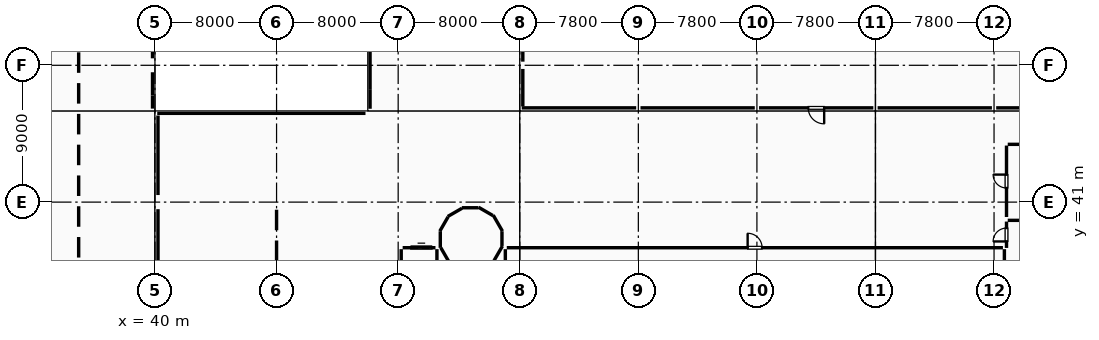
"""IFC4 building model, lengths in metres.
Left out: names, types, materials, properties, quantities, classifications, styles, units other than length and angle.
Written with IfcOpenShell. Run it as: python <this file> out.ifc"""

import sys

from ifc_helpers import new_model, si_unit, direction, frame, frame_2d, origin, origin_2d, place, context, subcontext, project, spatial, rectangle, hollow_rectangle, i_section, extrude, element, fill, save


model = new_model("IFC4")
c1 = context("Model", 3, precision=1e-05, world=origin(), true_north=direction((0.0, 1.0)))
c2 = subcontext(c1, "Body", "Model", "MODEL_VIEW")
j1 = project(units=[si_unit("LENGTHUNIT", "METRE"), si_unit("PLANEANGLEUNIT", "RADIAN")], contexts=[c1])
p1 = place(None, origin())
s1 = spatial("IfcSite", under=j1, at=p1, CompositionType="ELEMENT")
p2 = place(p1, origin())
s2 = spatial("IfcBuilding", under=s1, at=p2, CompositionType="ELEMENT")
p3 = place(p2, origin())
s3 = spatial("IfcBuildingStorey", under=s2, at=p3, CompositionType="ELEMENT", Elevation=0.0)
for number, where, z_axis, x_axis in (
    (1, (40.0, 41.0, 0.0), (0.0, 0.0, 1.0), (1.0, 0.0, 0.0)),
    (2, (40.0, 50.0, 0.0), (0.0, 0.0, 1.0), (1.0, 0.0, 0.0)),
):
    element("IfcColumn", number, at=place(p3, frame(where, z_axis=z_axis, x_axis=x_axis)), inside=s3, PredefinedType="COLUMN", context=c2, shape_type="SweptSolid", body=[
        extrude(rectangle(XDim=0.9, YDim=0.9, at=origin_2d()), origin(), (0.0, 0.0, 1.0), 5.4),
    ])
for number, where, z_axis, x_axis in (
    (3, (48.0, 41.0, 0.0), (0.0, 0.0, 1.0), (1.0, 0.0, 0.0)),
    (4, (56.0, 41.0, 0.0), (0.0, 0.0, 1.0), (1.0, 0.0, 0.0)),
):
    element("IfcColumn", number, at=place(p3, frame(where, z_axis=z_axis, x_axis=x_axis)), inside=s3, PredefinedType="COLUMN", context=c2, shape_type="SweptSolid", body=[
        extrude(rectangle(XDim=0.75, YDim=0.75, at=origin_2d()), origin(), (0.0, 0.0, 1.0), 5.4),
    ])
p4 = place(p3, frame((56.0, 50.0, 0.0), z_axis=(0.0, 0.0, 1.0), x_axis=(1.0, 0.0, 0.0)))
e5 = element("IfcColumn", 5, at=p4, inside=s3, PredefinedType="COLUMN", context=c2, shape_type="SweptSolid", body=[
    extrude(rectangle(XDim=0.9, YDim=0.9, at=origin_2d()), origin(), (0.0, 0.0, 1.0), 5.4),
])
p5 = place(p3, frame((64.0, 50.0, 0.0), z_axis=(0.0, 0.0, 1.0), x_axis=(1.0, 0.0, 0.0)))
e6 = element("IfcColumn", 6, at=p5, inside=s3, PredefinedType="COLUMN", context=c2, shape_type="SweptSolid", body=[
    extrude(hollow_rectangle(XDim=0.45, YDim=0.45, WallThickness=0.02, at=origin_2d()), origin(), (0.0, 0.0, 1.0), 5.4),
])
for number, where, z_axis, x_axis in (
    (7, (40.0, 48.2, 0.0), (0.0, 0.0, 1.0), (1.0, 0.0, 0.0)),
    (8, (54.0, 48.2, 0.0), (0.0, 0.0, 1.0), (1.0, 0.0, 0.0)),
):
    element("IfcColumn", number, at=place(p3, frame(where, z_axis=z_axis, x_axis=x_axis)), inside=s3, PredefinedType="COLUMN", context=c2, shape_type="SweptSolid", body=[
        extrude(i_section(OverallWidth=0.25, OverallDepth=0.35, WebThickness=0.01, FlangeThickness=0.012, FilletRadius=0.012, at=origin_2d()), origin(), (0.0, 0.0, 1.0), 5.4),
    ])
for number, where, z_axis, x_axis in (
    (9, (64.0, 47.0, 0.0), (0.0, 0.0, 1.0), (1.0, 0.0, 0.0)),
    (10, (71.8, 47.0, 0.0), (0.0, 0.0, 1.0), (1.0, 0.0, 0.0)),
    (11, (79.6, 47.0, 0.0), (0.0, 0.0, 1.0), (1.0, 0.0, 0.0)),
    (12, (87.4, 47.0, 0.0), (0.0, 0.0, 1.0), (1.0, 0.0, 0.0)),
    (13, (95.2, 47.0, 0.0), (0.0, 0.0, 1.0), (1.0, 0.0, 0.0)),
):
    element("IfcColumn", number, at=place(p3, frame(where, z_axis=z_axis, x_axis=x_axis)), inside=s3, PredefinedType="COLUMN", context=c2, shape_type="SweptSolid", body=[
        extrude(i_section(OverallWidth=0.25, OverallDepth=0.45, WebThickness=0.011, FlangeThickness=0.014, FilletRadius=0.015, at=origin_2d()), origin(), (0.0, 0.0, 1.0), 5.4),
    ])
p6 = place(p3, frame((70.0, 41.0, 0.0), z_axis=(0.0, 0.0, 1.0), x_axis=(1.0, 0.0, 0.0)))
e14 = element("IfcColumn", 14, at=p6, inside=s3, PredefinedType="COLUMN", context=c2, shape_type="SweptSolid", body=[
    extrude(rectangle(XDim=1.2, YDim=1.2, at=origin_2d()), origin(), (0.0, 0.0, 1.0), 5.4),
])
for number, where, z_axis, x_axis in (
    (15, (79.6, 41.0, 0.0), (0.0, 0.0, 1.0), (1.0, 0.0, 0.0)),
    (16, (87.4, 41.0, 0.0), (0.0, 0.0, 1.0), (1.0, 0.0, 0.0)),
    (17, (95.2, 41.0, 0.0), (0.0, 0.0, 1.0), (1.0, 0.0, 0.0)),
):
    element("IfcColumn", number, at=place(p3, frame(where, z_axis=z_axis, x_axis=x_axis)), inside=s3, PredefinedType="COLUMN", context=c2, shape_type="SweptSolid", body=[
        extrude(rectangle(XDim=1.05, YDim=1.05, at=origin_2d()), origin(), (0.0, 0.0, 1.0), 5.4),
    ])
p7 = place(p3, frame((39.84, 52.117, 0.0), z_axis=(0.0, 0.0, 1.0), x_axis=(0.0, -1.0, 0.0)))
e18 = element("IfcWall", 18, at=p7, inside=s3, PredefinedType="STANDARD", context=c2, shape_type="SweptSolid", body=[
    extrude(rectangle(XDim=1.659, YDim=0.28, at=frame_2d((0.83, 0.0))), origin(), (0.0, 0.0, 1.0), 5.12),
])
p8 = place(p3, frame((39.84, 49.542, 0.0), z_axis=(0.0, 0.0, 1.0), x_axis=(0.0, -1.0, 0.0)))
e19 = element("IfcWall", 19, at=p8, inside=s3, PredefinedType="STANDARD", context=c2, shape_type="SweptSolid", body=[
    extrude(rectangle(XDim=1.525, YDim=0.28, at=frame_2d((0.762, 0.0))), origin(), (0.0, 0.0, 1.0), 5.12),
])
p9 = place(p3, frame((39.84, 48.017, 0.0), z_axis=(0.0, 0.0, 1.0), x_axis=(0.0, -1.0, 0.0)))
e20 = element("IfcWall", 20, at=p9, inside=s3, PredefinedType="STANDARD", context=c2, shape_type="SweptSolid", body=[
    extrude(rectangle(XDim=0.867, YDim=0.28, at=frame_2d((0.434, 0.0))), origin(), (0.0, 0.0, 1.0), 4.355),
])
p10 = place(p3, frame((40.15, 46.84, 0.0), z_axis=(0.0, 0.0, 1.0), x_axis=(1.0, 0.0, 0.0)))
e21 = element("IfcWall", 21, at=p10, inside=s3, PredefinedType="STANDARD", context=c2, shape_type="SweptSolid", body=[
    extrude(rectangle(XDim=13.7, YDim=0.28, at=frame_2d((6.85, 0.0))), origin(), (0.0, 0.0, 1.0), 5.12),
])
p11 = place(p10, frame((5.65, 0.0, 0.95)))
e22 = element("IfcOpeningElement", 22, at=p11, cuts=e21, PredefinedType="OPENING", context=c2, shape_type="SweptSolid", body=[
    extrude(rectangle(XDim=2.4, YDim=2.1, at=frame_2d((1.2, 1.05))), frame((0.0, 0.15, 0.0), z_axis=(0.0, -1.0, 0.0), x_axis=(1.0, 0.0, 0.0)), (0.0, 0.0, 1.0), 0.3),
])
p12 = place(p3, frame((54.15, 47.14, 0.0), z_axis=(0.0, 0.0, 1.0), x_axis=(0.0, 1.0, 0.0)))
e23 = element("IfcWall", 23, at=p12, inside=s3, PredefinedType="ELEMENTEDWALL", context=c2, shape_type="SweptSolid", body=[
    extrude(rectangle(XDim=1.243, YDim=0.26, at=frame_2d((0.622, 0.0))), origin(), (0.0, 0.0, 1.0), 5.12),
])
p13 = place(p3, frame((54.15, 48.383, 0.0), z_axis=(0.0, 0.0, 1.0), x_axis=(0.0, 1.0, 0.0)))
e24 = element("IfcWall", 24, at=p13, inside=s3, PredefinedType="ELEMENTEDWALL", context=c2, shape_type="SweptSolid", body=[
    extrude(rectangle(XDim=4.1, YDim=0.26, at=frame_2d((2.05, 0.0))), origin(), (0.0, 0.0, 1.0), 3.675),
])
p14 = place(p13, frame((1.417, 0.0, 0.95)))
e25 = element("IfcOpeningElement", 25, at=p14, cuts=e24, PredefinedType="OPENING", context=c2, shape_type="SweptSolid", body=[
    extrude(rectangle(XDim=0.9, YDim=1.2, at=frame_2d((0.45, 0.6))), frame((0.0, 0.14, 0.0), z_axis=(0.0, -1.0, 0.0), x_axis=(1.0, 0.0, 0.0)), (0.0, 0.0, 1.0), 0.28),
])
p15 = place(p3, frame((62.861, 39.086, 0.0), z_axis=(0.0, 0.0, 1.0), x_axis=(-0.499930512259, 0.866065518833, 0.0)))
e26 = element("IfcWall", 26, at=p15, inside=s3, PredefinedType="SHEAR", context=c2, shape_type="SweptSolid", body=[
    extrude(rectangle(XDim=1.219, YDim=0.35, at=frame_2d((0.609, 0.0))), origin(), (0.0, 0.0, 1.0), 5.12),
])
for number, where, z_axis, x_axis in (
    (27, (62.233, 40.115, 0.0), (0.0, 0.0, 1.0), (-0.866, 0.5, 0.0)),
    (28, (61.283, 40.628, 0.0), (0.0, 0.0, 1.0), (-1.0, 0.0, 0.0)),
    (29, (60.205, 40.598, 0.0), (0.0, 0.0, 1.0), (-0.866, -0.5, 0.0)),
    (30, (59.285, 40.033, 0.0), (0.0, 0.0, 1.0), (-0.5, -0.866, 0.0)),
    (31, (58.771, 39.083, 0.0), (0.0, 0.0, 1.0), (0.0, -1.0, 0.0)),
    (32, (58.802, 38.004, 0.0), (0.0, 0.0, 1.0), (0.5, -0.866, 0.0)),
):
    element("IfcWall", number, at=place(p3, frame(where, z_axis=z_axis, x_axis=x_axis)), inside=s3, PredefinedType="SHEAR", context=c2, shape_type="SweptSolid", body=[
        extrude(rectangle(XDim=1.093, YDim=0.35, at=frame_2d((0.546, 0.0))), origin(), (0.0, 0.0, 1.0), 5.12),
    ])
p16 = place(p3, frame((59.367, 37.085, 0.0), z_axis=(0.0, 0.0, 1.0), x_axis=(0.866021955858, -0.500005971936, 0.0)))
e33 = element("IfcWall", 33, at=p16, inside=s3, PredefinedType="SHEAR", context=c2, shape_type="SweptSolid", body=[
    extrude(rectangle(XDim=1.093, YDim=0.35, at=frame_2d((0.547, 0.0))), origin(), (0.0, 0.0, 1.0), 5.12),
])
for number, where, z_axis, x_axis in (
    (34, (61.396, 36.602, 0.0), (0.0, 0.0, 1.0), (0.866, 0.5, 0.0)),
    (35, (62.315, 37.167, 0.0), (0.0, 0.0, 1.0), (0.5, 0.866, 0.0)),
):
    element("IfcWall", number, at=place(p3, frame(where, z_axis=z_axis, x_axis=x_axis)), inside=s3, PredefinedType="SHEAR", context=c2, shape_type="SweptSolid", body=[
        extrude(rectangle(XDim=1.093, YDim=0.35, at=frame_2d((0.546, 0.0))), origin(), (0.0, 0.0, 1.0), 5.12),
    ])
p17 = place(p3, frame((62.828, 38.116, 0.0), z_axis=(0.0, 0.0, 1.0), x_axis=(0.0, 1.0, 0.0)))
e36 = element("IfcWall", 36, at=p17, inside=s3, PredefinedType="SHEAR", context=c2, shape_type="SweptSolid", body=[
    extrude(rectangle(XDim=0.967, YDim=0.35, at=frame_2d((0.483, 0.0))), origin(), (0.0, 0.0, 1.0), 5.12),
])
for number, where, z_axis, x_axis in (
    (37, (58.55, 37.905, 0.0), (0.0, 0.0, 1.0), (0.0, -1.0, 0.0)),
    (38, (63.05, 36.445, 0.0), (0.0, 0.0, 1.0), (0.0, 1.0, 0.0)),
):
    element("IfcWall", number, at=place(p3, frame(where, z_axis=z_axis, x_axis=x_axis)), inside=s3, PredefinedType="PARTITIONING", context=c2, shape_type="SweptSolid", body=[
        extrude(rectangle(XDim=1.46, YDim=0.15, at=frame_2d((0.73, 0.0))), origin(), (0.0, 0.0, 1.0), 5.11),
    ])
p18 = place(p3, frame((63.145, 38.0, 0.0), z_axis=(0.0, 0.0, 1.0), x_axis=(1.0, 0.0, 0.0)))
e39 = element("IfcWall", 39, at=p18, inside=s3, PredefinedType="PARTITIONING", context=c2, shape_type="SweptSolid", body=[
    extrude(rectangle(XDim=32.64, YDim=0.15, at=frame_2d((16.32, 0.0))), origin(), (0.0, 0.0, 1.0), 4.3),
])
p19 = place(p18, frame((15.845, 0.0, 0.0)))
e40 = element("IfcOpeningElement", 40, at=p19, cuts=e39, PredefinedType="OPENING", context=c2, shape_type="SweptSolid", body=[
    extrude(rectangle(XDim=0.95, YDim=2.15, at=frame_2d((0.475, 1.075))), frame((0.0, 0.085, 0.0), z_axis=(0.0, -1.0, 0.0), x_axis=(1.0, 0.0, 0.0)), (0.0, 0.0, 1.0), 0.17),
])
p20 = place(p3, frame((95.88, 37.905, 0.0), z_axis=(0.0, 0.0, 1.0), x_axis=(0.0, -1.0, 0.0)))
e41 = element("IfcWall", 41, at=p20, inside=s3, PredefinedType="PARTITIONING", context=c2, shape_type="SweptSolid", body=[
    extrude(rectangle(XDim=13.78, YDim=0.15, at=frame_2d((6.89, 0.0))), origin(), (0.0, 0.0, 1.0), 5.4),
])
p21 = place(p20, frame((6.45, 0.0, 0.0)))
e42 = element("IfcOpeningElement", 42, at=p21, cuts=e41, PredefinedType="OPENING", context=c2, shape_type="SweptSolid", body=[
    extrude(rectangle(XDim=0.88, YDim=2.1, at=frame_2d((0.44, 1.05))), frame((0.0, 0.085, 0.0), z_axis=(0.0, -1.0, 0.0), x_axis=(1.0, 0.0, 0.0)), (0.0, 0.0, 1.0), 0.17),
])
p22 = place(p3, frame((56.2, 32.39, 0.0), z_axis=(0.0, 0.0, 1.0), x_axis=(0.0, 1.0, 0.0)))
e43 = element("IfcWall", 43, at=p22, inside=s3, PredefinedType="PARTITIONING", context=c2, shape_type="SweptSolid", body=[
    extrude(rectangle(XDim=5.515, YDim=0.15, at=frame_2d((2.758, 0.0))), origin(), (0.0, 0.0, 1.0), 4.5),
])
p23 = place(p22, frame((2.601, 0.0, 0.0)))
e44 = element("IfcOpeningElement", 44, at=p23, cuts=e43, PredefinedType="OPENING", context=c2, shape_type="SweptSolid", body=[
    extrude(rectangle(XDim=1.8, YDim=2.15, at=frame_2d((0.9, 1.075))), frame((0.0, 0.085, 0.0), z_axis=(0.0, -1.0, 0.0), x_axis=(1.0, 0.0, 0.0)), (0.0, 0.0, 1.0), 0.17),
])
p24 = place(p3, frame((56.295, 38.0, 0.0), z_axis=(0.0, 0.0, 1.0), x_axis=(1.0, 0.0, 0.0)))
e45 = element("IfcWall", 45, at=p24, inside=s3, PredefinedType="PARTITIONING", context=c2, shape_type="SweptSolid", body=[
    extrude(rectangle(XDim=2.16, YDim=0.15, at=frame_2d((1.08, 0.0))), origin(), (0.0, 0.0, 1.0), 5.11),
])
p25 = place(p24, frame((0.532, 0.0, 0.0)))
e46 = element("IfcOpeningElement", 46, at=p25, cuts=e45, PredefinedType="OPENING", context=c2, shape_type="SweptSolid", body=[
    extrude(rectangle(XDim=1.4, YDim=2.15, at=frame_2d((0.7, 1.075))), frame((0.0, 0.085, 0.0), z_axis=(0.0, -1.0, 0.0), x_axis=(1.0, 0.0, 0.0)), (0.0, 0.0, 1.0), 0.17),
])
p26 = place(p3, frame((40.2, 34.52, 0.0), z_axis=(0.0, 0.0, 1.0), x_axis=(0.0, 1.0, 0.0)))
e47 = element("IfcWall", 47, at=p26, inside=s3, PredefinedType="PARTITIONING", context=c2, shape_type="SweptSolid", body=[
    extrude(rectangle(XDim=6.015, YDim=0.2, at=frame_2d((3.007, 0.0))), origin(), (0.0, 0.0, 1.0), 4.25),
])
p27 = place(p3, frame((40.2, 41.465, 0.0), z_axis=(0.0, 0.0, 1.0), x_axis=(0.0, 1.0, 0.0)))
e48 = element("IfcWall", 48, at=p27, inside=s3, PredefinedType="PARTITIONING", context=c2, shape_type="SweptSolid", body=[
    extrude(rectangle(XDim=5.231, YDim=0.2, at=frame_2d((2.615, 0.0))), origin(), (0.0, 0.0, 1.0), 4.35),
])
p28 = place(p3, frame((102.871, 47.2, 0.0), z_axis=(0.0, 0.0, 1.0), x_axis=(-1.0, 0.0, 0.0)))
e49 = element("IfcWall", 49, at=p28, inside=s3, PredefinedType="PARTITIONING", context=c2, shape_type="SweptSolid", body=[
    extrude(rectangle(XDim=7.531, YDim=0.15, at=frame_2d((3.766, 0.0))), origin(), (0.0, 0.0, 1.0), 4.3),
])
p29 = place(p3, frame((95.06, 47.2, 0.0), z_axis=(0.0, 0.0, 1.0), x_axis=(-1.0, 0.0, 0.0)))
e50 = element("IfcWall", 50, at=p29, inside=s3, PredefinedType="PARTITIONING", context=c2, shape_type="SweptSolid", body=[
    extrude(rectangle(XDim=7.52, YDim=0.15, at=frame_2d((3.76, 0.0))), origin(), (0.0, 0.0, 1.0), 4.3),
])
p30 = place(p3, frame((87.26, 47.2, 0.0), z_axis=(0.0, 0.0, 1.0), x_axis=(-1.0, 0.0, 0.0)))
e51 = element("IfcWall", 51, at=p30, inside=s3, PredefinedType="PARTITIONING", context=c2, shape_type="SweptSolid", body=[
    extrude(rectangle(XDim=7.52, YDim=0.15, at=frame_2d((3.76, 0.0))), origin(), (0.0, 0.0, 1.0), 4.3),
])
p31 = place(p30, frame((3.235, 0.0, 0.0)))
e52 = element("IfcOpeningElement", 52, at=p31, cuts=e51, PredefinedType="OPENING", context=c2, shape_type="SweptSolid", body=[
    extrude(rectangle(XDim=1.05, YDim=2.15, at=frame_2d((0.525, 1.075))), frame((0.0, 0.085, 0.0), z_axis=(0.0, -1.0, 0.0), x_axis=(1.0, 0.0, 0.0)), (0.0, 0.0, 1.0), 0.17),
])
p32 = place(p3, frame((79.46, 47.2, 0.0), z_axis=(0.0, 0.0, 1.0), x_axis=(-1.0, 0.0, 0.0)))
e53 = element("IfcWall", 53, at=p32, inside=s3, PredefinedType="PARTITIONING", context=c2, shape_type="SweptSolid", body=[
    extrude(rectangle(XDim=7.52, YDim=0.15, at=frame_2d((3.76, 0.0))), origin(), (0.0, 0.0, 1.0), 4.3),
])
p33 = place(p3, frame((71.66, 47.2, 0.0), z_axis=(0.0, 0.0, 1.0), x_axis=(-1.0, 0.0, 0.0)))
e54 = element("IfcWall", 54, at=p33, inside=s3, PredefinedType="PARTITIONING", context=c2, shape_type="SweptSolid", body=[
    extrude(rectangle(XDim=7.531, YDim=0.15, at=frame_2d((3.766, 0.0))), origin(), (0.0, 0.0, 1.0), 4.3),
])
p34 = place(p3, frame((64.2, 47.295, 0.0), z_axis=(0.0, 0.0, 1.0), x_axis=(0.0, 1.0, 0.0)))
e55 = element("IfcWall", 55, at=p34, inside=s3, PredefinedType="PARTITIONING", context=c2, shape_type="SweptSolid", body=[
    extrude(rectangle(XDim=2.465, YDim=0.15, at=frame_2d((1.232, 0.0))), origin(), (0.0, 0.0, 1.0), 4.5),
])
p35 = place(p3, frame((64.2, 50.24, 0.0), z_axis=(0.0, 0.0, 1.0), x_axis=(0.0, 1.0, 0.0)))
e56 = element("IfcWall", 56, at=p35, inside=s3, PredefinedType="PARTITIONING", context=c2, shape_type="SweptSolid", body=[
    extrude(rectangle(XDim=5.52, YDim=0.15, at=frame_2d((2.76, 0.0))), origin(), (0.0, 0.0, 1.0), 4.55),
])
p36 = place(p3, frame((96.02, 37.985, 0.0), z_axis=(0.0, 0.0, 1.0), x_axis=(0.0, 1.0, 0.0)))
e57 = element("IfcWall", 57, at=p36, inside=s3, PredefinedType="PARTITIONING", context=c2, shape_type="SweptSolid", body=[
    extrude(rectangle(XDim=1.735, YDim=0.12, at=frame_2d((0.867, 0.0))), origin(), (0.0, 0.0, 1.0), 5.11),
])
p37 = place(p36, frame((0.427, 0.0, 0.0)))
e58 = element("IfcOpeningElement", 58, at=p37, cuts=e57, PredefinedType="OPENING", context=c2, shape_type="SweptSolid", body=[
    extrude(rectangle(XDim=0.88, YDim=2.1, at=frame_2d((0.44, 1.05))), frame((0.0, 0.07, 0.0), z_axis=(0.0, -1.0, 0.0), x_axis=(1.0, 0.0, 0.0)), (0.0, 0.0, 1.0), 0.14),
])
p38 = place(p3, frame((96.1, 39.8, 0.0), z_axis=(0.0, 0.0, 1.0), x_axis=(1.0, 0.0, 0.0)))
e59 = element("IfcWall", 59, at=p38, inside=s3, PredefinedType="PARTITIONING", context=c2, shape_type="SweptSolid", body=[
    extrude(rectangle(XDim=6.12, YDim=0.12, at=frame_2d((3.06, 0.0))), origin(), (0.0, 0.0, 1.0), 5.11),
])
p39 = place(p3, frame((96.02, 40.02, 0.0), z_axis=(0.0, 0.0, 1.0), x_axis=(0.0, 1.0, 0.0)))
e60 = element("IfcWall", 60, at=p39, inside=s3, PredefinedType="PARTITIONING", context=c2, shape_type="SweptSolid", body=[
    extrude(rectangle(XDim=4.7, YDim=0.12, at=frame_2d((2.35, 0.0))), origin(), (0.0, 0.0, 1.0), 5.11),
])
p40 = place(p39, frame((1.91, 0.0, 0.0)))
e61 = element("IfcOpeningElement", 61, at=p40, cuts=e60, PredefinedType="OPENING", context=c2, shape_type="SweptSolid", body=[
    extrude(rectangle(XDim=0.88, YDim=2.1, at=frame_2d((0.44, 1.05))), frame((0.0, 0.07, 0.0), z_axis=(0.0, -1.0, 0.0), x_axis=(1.0, 0.0, 0.0)), (0.0, 0.0, 1.0), 0.14),
])
p41 = place(p3, frame((96.1, 44.8, 0.0), z_axis=(0.0, 0.0, 1.0), x_axis=(1.0, 0.0, 0.0)))
e62 = element("IfcWall", 62, at=p41, inside=s3, PredefinedType="PARTITIONING", context=c2, shape_type="SweptSolid", body=[
    extrude(rectangle(XDim=4.22, YDim=0.12, at=frame_2d((2.11, 0.0))), origin(), (0.0, 0.0, 1.0), 5.11),
])
p42 = place(p11, origin())
e63 = element("IfcWindow", 63, at=p42, inside=s3, PartitioningType="SINGLE_PANEL", PredefinedType="SKYLIGHT", context=c2, shape_type="SweptSolid", body=[
    extrude(rectangle(XDim=2.4, YDim=2.1, at=frame_2d((1.2, 1.05))), frame((0.0, 0.03, 0.0), z_axis=(0.0, -1.0, 0.0), x_axis=(1.0, 0.0, 0.0)), (0.0, 0.0, 1.0), 0.06),
])
fill(e22, e63)
p43 = place(p14, origin())
e64 = element("IfcWindow", 64, at=p43, inside=s3, PartitioningType="SINGLE_PANEL", PredefinedType="WINDOW", context=c2, shape_type="SweptSolid", body=[
    extrude(rectangle(XDim=0.9, YDim=1.2, at=frame_2d((0.45, 0.6))), frame((0.0, 0.03, 0.0), z_axis=(0.0, -1.0, 0.0), x_axis=(1.0, 0.0, 0.0)), (0.0, 0.0, 1.0), 0.06),
])
fill(e25, e64)
p44 = place(p19, origin())
e65 = element("IfcDoor", 65, at=p44, inside=s3, OperationType="SINGLE_SWING_LEFT", PredefinedType="DOOR", context=c2, shape_type="SweptSolid", body=[
    extrude(rectangle(XDim=0.95, YDim=2.15, at=frame_2d((0.475, 1.075))), frame((0.0, 0.025, 0.0), z_axis=(0.0, -1.0, 0.0), x_axis=(1.0, 0.0, 0.0)), (0.0, 0.0, 1.0), 0.05),
])
fill(e40, e65)
p45 = place(p31, origin())
e66 = element("IfcDoor", 66, at=p45, inside=s3, OperationType="SINGLE_SWING_LEFT", PredefinedType="DOOR", context=c2, shape_type="SweptSolid", body=[
    extrude(rectangle(XDim=1.05, YDim=2.15, at=frame_2d((0.525, 1.075))), frame((0.0, 0.025, 0.0), z_axis=(0.0, -1.0, 0.0), x_axis=(1.0, 0.0, 0.0)), (0.0, 0.0, 1.0), 0.05),
])
fill(e52, e66)
p46 = place(p37, origin())
e67 = element("IfcDoor", 67, at=p46, inside=s3, OperationType="SINGLE_SWING_LEFT", PredefinedType="DOOR", context=c2, shape_type="SweptSolid", body=[
    extrude(rectangle(XDim=0.88, YDim=2.1, at=frame_2d((0.44, 1.05))), frame((0.0, 0.025, 0.0), z_axis=(0.0, -1.0, 0.0), x_axis=(1.0, 0.0, 0.0)), (0.0, 0.0, 1.0), 0.05),
])
fill(e58, e67)
p47 = place(p40, origin())
e68 = element("IfcDoor", 68, at=p47, inside=s3, OperationType="SINGLE_SWING_RIGHT", PredefinedType="DOOR", context=c2, shape_type="SweptSolid", body=[
    extrude(rectangle(XDim=0.88, YDim=2.1, at=frame_2d((0.44, 1.05))), frame((0.0, 0.025, 0.0), z_axis=(0.0, -1.0, 0.0), x_axis=(1.0, 0.0, 0.0)), (0.0, 0.0, 1.0), 0.05),
])
fill(e61, e68)
p48 = place(p25, origin())
e69 = element("IfcDoor", 69, at=p48, inside=s3, OperationType="SLIDING_TO_LEFT", PredefinedType="DOOR", context=c2, shape_type="SweptSolid", body=[
    extrude(rectangle(XDim=1.4, YDim=2.15, at=frame_2d((0.7, 1.075))), frame((0.0, 0.025, 0.0), z_axis=(0.0, -1.0, 0.0), x_axis=(1.0, 0.0, 0.0)), (0.0, 0.0, 1.0), 0.05),
])
fill(e46, e69)
save(model, sys.argv[1])
